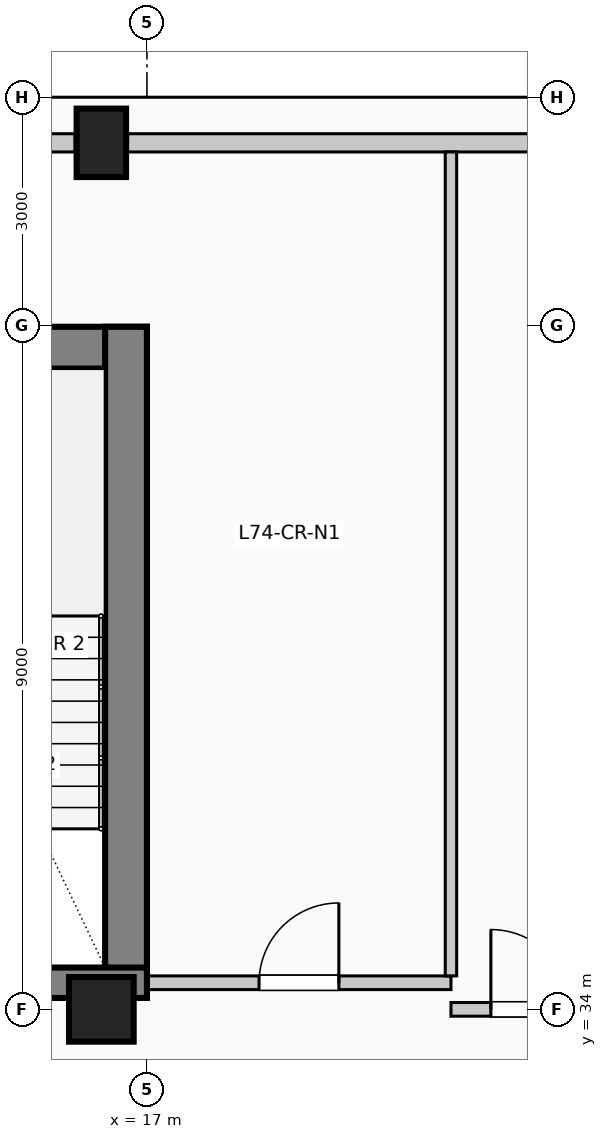
"""IFC4 building model, lengths in metres.
Left out: names, types, materials, properties, quantities, classifications, styles, units other than length and angle.
Written with IfcOpenShell. Run it as: python <this file> out.ifc"""

import sys

from ifc_helpers import new_model, si_unit, direction, frame, frame_2d, origin, origin_2d, place, context, subcontext, project, spatial, rectangle, circle, extrude, element, fill, save


model = new_model("IFC4")
c1 = context("Model", 3, precision=1e-05, world=origin(), true_north=direction((0.0, 1.0)))
c2 = subcontext(c1, "Body", "Model", "MODEL_VIEW")
j1 = project(units=[si_unit("LENGTHUNIT", "METRE"), si_unit("PLANEANGLEUNIT", "RADIAN")], contexts=[c1])
p1 = place(None, origin())
s1 = spatial("IfcSite", under=j1, at=p1, CompositionType="ELEMENT")
p2 = place(p1, origin())
s2 = spatial("IfcBuilding", under=s1, at=p2, CompositionType="ELEMENT")
p3 = place(p2, frame((0.0, 0.0, 305.0)))
s3 = spatial("IfcBuildingStorey", under=s2, at=p3, CompositionType="ELEMENT", Elevation=305.0)
p4 = place(p3, frame((3.0, 42.705, 0.0), z_axis=(0.0, 0.0, 1.0), x_axis=(1.0, 0.0, 0.0)))
e1 = element("IfcWall", 1, at=p4, inside=s3, PredefinedType="SHEAR", context=c2, shape_type="SweptSolid", body=[
    extrude(rectangle(XDim=14.0, YDim=0.55, at=frame_2d((7.0, 0.0))), origin(), (0.0, 0.0, 1.0), 4.0),
])
p5 = place(p3, frame((16.725, 34.15, 0.0), z_axis=(0.0, 0.0, 1.0), x_axis=(0.0, 1.0, 0.0)))
e2 = element("IfcWall", 2, at=p5, inside=s3, PredefinedType="SHEAR", context=c2, shape_type="SweptSolid", body=[
    extrude(rectangle(XDim=8.83, YDim=0.55, at=frame_2d((4.415, 0.0))), origin(), (0.0, 0.0, 1.0), 4.0),
])
p6 = place(p3, frame((12.29, 34.35, 0.0), z_axis=(0.0, 0.0, 1.0), x_axis=(1.0, 0.0, 0.0)))
e3 = element("IfcWall", 3, at=p6, inside=s3, PredefinedType="SHEAR", context=c2, shape_type="SweptSolid", body=[
    extrude(rectangle(XDim=4.71, YDim=0.4, at=frame_2d((2.355, 0.0))), origin(), (0.0, 0.0, 1.0), 4.0),
])
p7 = place(p6, frame((1.4, 0.0, 0.0)))
e4 = element("IfcOpeningElement", 4, at=p7, cuts=e3, PredefinedType="OPENING", context=c2, shape_type="SweptSolid", body=[
    extrude(rectangle(XDim=1.15, YDim=2.2, at=frame_2d((0.575, 1.1))), frame((0.0, 0.21, 0.0), z_axis=(0.0, -1.0, 0.0), x_axis=(1.0, 0.0, 0.0)), (0.0, 0.0, 1.0), 0.42),
])
p8 = place(p3, frame((16.4, 45.4, 0.0), z_axis=(0.0, 0.0, 1.0), x_axis=(1.0, 0.0, 0.0)))
e5 = element("IfcColumn", 5, at=p8, inside=s3, PredefinedType="COLUMN", context=c2, shape_type="SweptSolid", body=[
    extrude(rectangle(XDim=0.65, YDim=0.9, at=origin_2d()), origin(), (0.0, 0.0, 1.0), 4.0),
])
p9 = place(p3, frame((16.4, 34.0, 0.0), z_axis=(0.0, 0.0, 1.0), x_axis=(1.0, 0.0, 0.0)))
e6 = element("IfcColumn", 6, at=p9, inside=s3, PredefinedType="COLUMN", context=c2, shape_type="SweptSolid", body=[
    extrude(circle(Radius=0.425, at=origin_2d()), origin(), (0.0, 0.0, 1.0), 4.0),
])
p10 = place(p3, frame((14.345, 45.4, 0.0), z_axis=(0.0, 0.0, 1.0), x_axis=(1.0, 0.0, 0.0)))
e7 = element("IfcWall", 7, at=p10, inside=s3, PredefinedType="SOLIDWALL", context=c2, shape_type="SweptSolid", body=[
    extrude(rectangle(XDim=1.71, YDim=0.24, at=frame_2d((0.855, 0.0))), origin(), (0.0, 0.0, 1.0), 3.025),
])
p11 = place(p3, frame((16.745, 45.4, 0.0), z_axis=(0.0, 0.0, 1.0), x_axis=(1.0, 0.0, 0.0)))
e8 = element("IfcWall", 8, at=p11, inside=s3, PredefinedType="SOLIDWALL", context=c2, shape_type="SweptSolid", body=[
    extrude(rectangle(XDim=6.91, YDim=0.24, at=frame_2d((3.455, 0.0))), origin(), (0.0, 0.0, 1.0), 3.025),
])
p12 = place(p3, frame((21.0, 34.0, 0.0), z_axis=(0.0, 0.0, 1.0), x_axis=(1.0, 0.0, 0.0)))
e9 = element("IfcWall", 9, at=p12, inside=s3, PredefinedType="PARTITIONING", context=c2, shape_type="SweptSolid", body=[
    extrude(rectangle(XDim=2.1, YDim=0.18, at=frame_2d((1.05, 0.0))), origin(), (0.0, 0.0, 1.0), 3.27),
])
p13 = place(p12, frame((0.525, 0.0, 0.0)))
e10 = element("IfcOpeningElement", 10, at=p13, cuts=e9, PredefinedType="OPENING", context=c2, shape_type="SweptSolid", body=[
    extrude(rectangle(XDim=1.05, YDim=2.15, at=frame_2d((0.525, 1.075))), frame((0.0, 0.1, 0.0), z_axis=(0.0, -1.0, 0.0), x_axis=(1.0, 0.0, 0.0)), (0.0, 0.0, 1.0), 0.2),
])
p14 = place(p3, frame((17.0, 34.35, 0.0), z_axis=(0.0, 0.0, 1.0), x_axis=(1.0, 0.0, 0.0)))
e11 = element("IfcWall", 11, at=p14, inside=s3, PredefinedType="PARTITIONING", context=c2, shape_type="SweptSolid", body=[
    extrude(rectangle(XDim=4.0, YDim=0.18, at=frame_2d((2.0, 0.0))), origin(), (0.0, 0.0, 1.0), 3.775),
])
p15 = place(p14, frame((1.475, 0.0, 0.0)))
e12 = element("IfcOpeningElement", 12, at=p15, cuts=e11, PredefinedType="OPENING", context=c2, shape_type="SweptSolid", body=[
    extrude(rectangle(XDim=1.05, YDim=2.15, at=frame_2d((0.525, 1.075))), frame((0.0, 0.1, 0.0), z_axis=(0.0, -1.0, 0.0), x_axis=(1.0, 0.0, 0.0)), (0.0, 0.0, 1.0), 0.2),
])
p16 = place(p3, frame((21.0, 34.44, 0.0), z_axis=(0.0, 0.0, 1.0), x_axis=(0.0, 1.0, 0.0)))
e13 = element("IfcWall", 13, at=p16, inside=s3, PredefinedType="PARTITIONING", context=c2, shape_type="SweptSolid", body=[
    extrude(rectangle(XDim=10.84, YDim=0.15, at=frame_2d((5.42, 0.0))), origin(), (0.0, 0.0, 1.0), 3.775),
])
p17 = place(p13, origin())
e14 = element("IfcDoor", 14, at=p17, inside=s3, OperationType="SINGLE_SWING_LEFT", PredefinedType="DOOR", context=c2, shape_type="SweptSolid", body=[
    extrude(rectangle(XDim=1.05, YDim=2.15, at=frame_2d((0.525, 1.075))), frame((0.0, 0.025, 0.0), z_axis=(0.0, -1.0, 0.0), x_axis=(1.0, 0.0, 0.0)), (0.0, 0.0, 1.0), 0.05),
])
fill(e10, e14)
p18 = place(p15, origin())
e15 = element("IfcDoor", 15, at=p18, inside=s3, OperationType="SINGLE_SWING_RIGHT", PredefinedType="DOOR", context=c2, shape_type="SweptSolid", body=[
    extrude(rectangle(XDim=1.05, YDim=2.15, at=frame_2d((0.525, 1.075))), frame((0.0, 0.025, 0.0), z_axis=(0.0, -1.0, 0.0), x_axis=(1.0, 0.0, 0.0)), (0.0, 0.0, 1.0), 0.05),
])
fill(e12, e15)
save(model, sys.argv[1])
